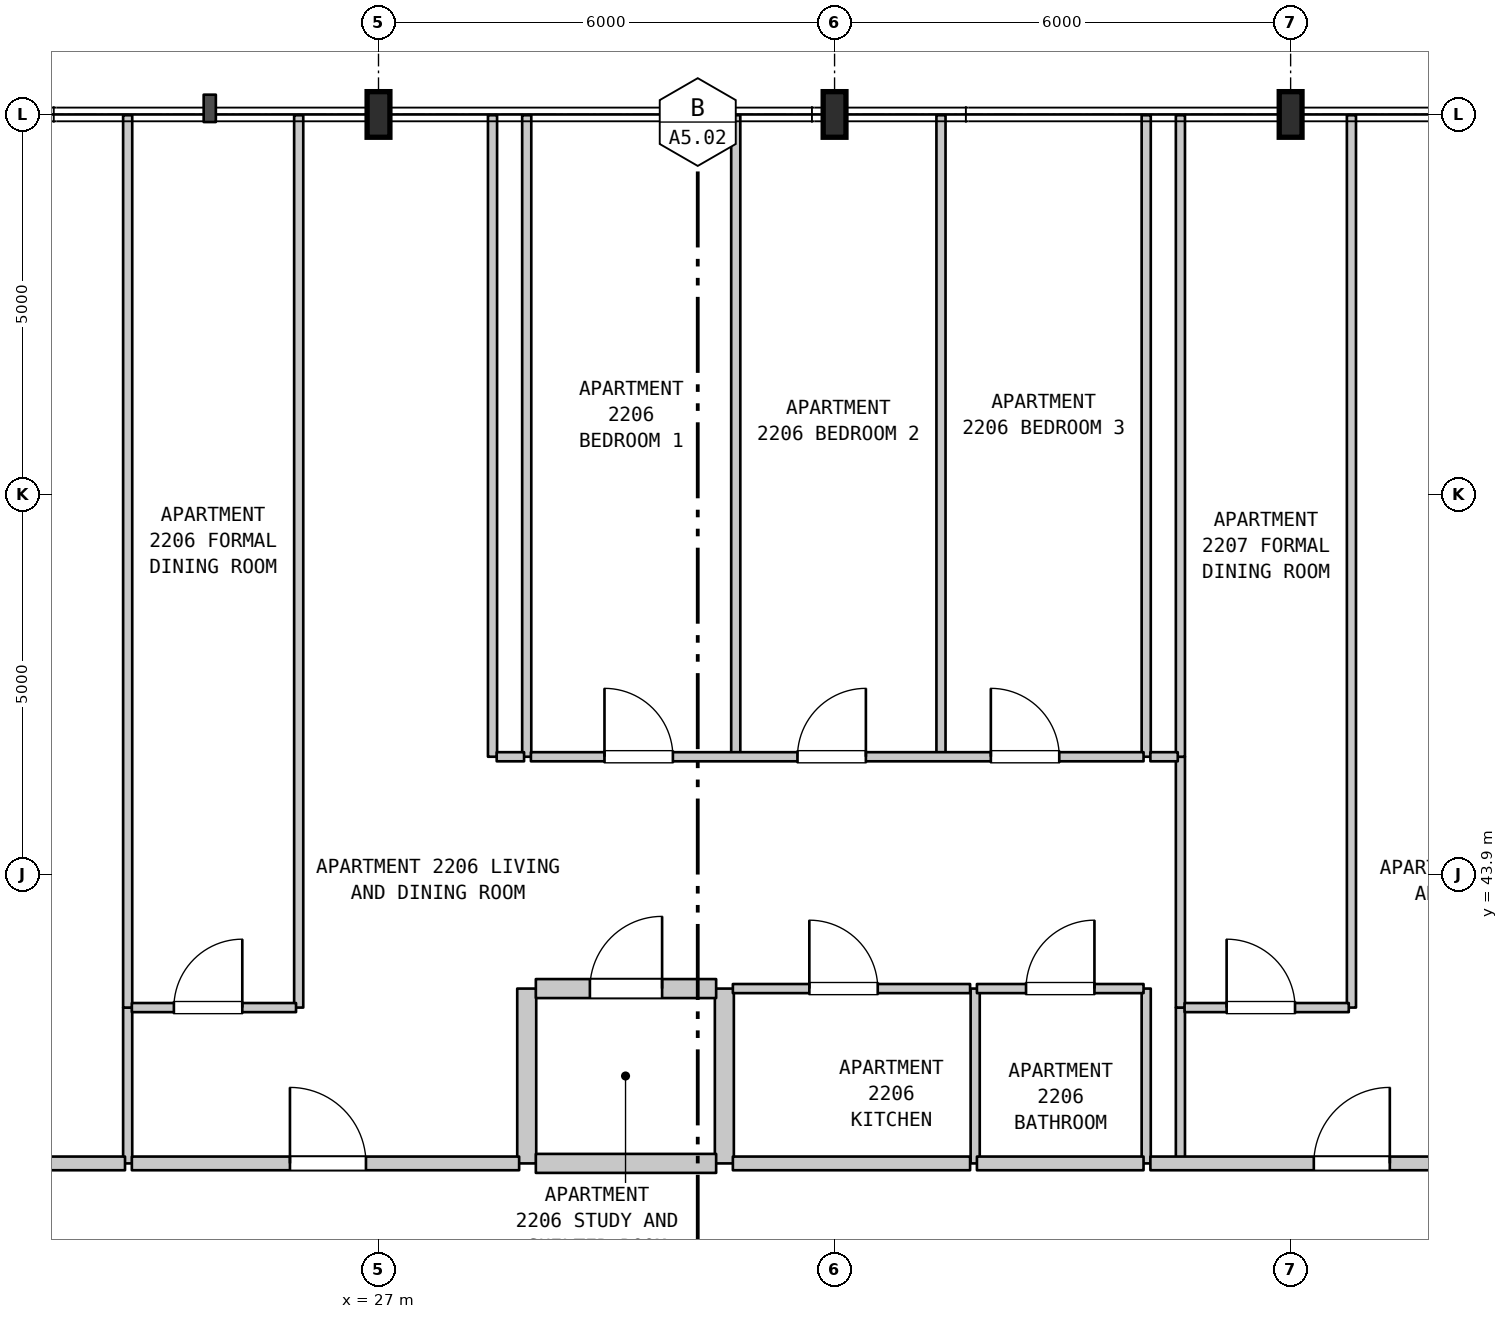
"""IFC4 building model, lengths in metres.
Left out: names, types, materials, properties, quantities, classifications, styles, units other than length and angle.
Written with IfcOpenShell. Run it as: python <this file> out.ifc"""

import sys

from ifc_helpers import new_model, si_unit, direction, frame, frame_2d, origin, origin_2d, place, context, subcontext, project, spatial, rectangle, i_section, extrude, element, fill, save


model = new_model("IFC4")
c1 = context("Model", 3, precision=1e-05, world=origin(), true_north=direction((0.0, 1.0)))
c2 = subcontext(c1, "Body", "Model", "MODEL_VIEW")
j1 = project(units=[si_unit("LENGTHUNIT", "METRE"), si_unit("PLANEANGLEUNIT", "RADIAN")], contexts=[c1])
p1 = place(None, origin())
s1 = spatial("IfcSite", under=j1, at=p1, CompositionType="ELEMENT")
p2 = place(p1, origin())
s2 = spatial("IfcBuilding", under=s1, at=p2, CompositionType="ELEMENT")
p3 = place(p2, frame((0.0, 0.0, 94.6)))
s3 = spatial("IfcBuildingStorey", under=s2, at=p3, CompositionType="ELEMENT", Elevation=94.6)
for number, where, z_axis, x_axis in (
    (1, (27.0, 53.9, 0.0), (0.0, 0.0, 1.0), (1.0, 0.0, 0.0)),
    (2, (33.0, 53.9, 0.0), (0.0, 0.0, 1.0), (1.0, 0.0, 0.0)),
    (3, (39.0, 53.9, 0.0), (0.0, 0.0, 1.0), (1.0, 0.0, 0.0)),
):
    element("IfcColumn", number, at=place(p3, frame(where, z_axis=z_axis, x_axis=x_axis)), inside=s3, PredefinedType="COLUMN", context=c2, shape_type="SweptSolid", body=[
        extrude(i_section(OverallWidth=0.3, OverallDepth=0.6, WebThickness=0.015, FlangeThickness=0.03, FilletRadius=0.027, at=origin_2d()), origin(), (0.0, 0.0, 1.0), 3.7),
    ])
p4 = place(p3, frame((23.7, 40.1, 0.0), z_axis=(0.0, 0.0, 1.0), x_axis=(0.0, 1.0, 0.0)))
e4 = element("IfcWall", 4, at=p4, inside=s3, PredefinedType="PARTITIONING", context=c2, shape_type="SweptSolid", body=[
    extrude(rectangle(XDim=2.05, YDim=0.12, at=frame_2d((1.025, 0.0))), origin(), (0.0, 0.0, 1.0), 3.385),
])
for number, where, z_axis, x_axis in (
    (5, (23.7, 42.15, 0.0), (0.0, 0.0, 1.0), (0.0, 1.0, 0.0)),
    (6, (25.95, 42.15, 0.0), (0.0, 0.0, 1.0), (0.0, 1.0, 0.0)),
):
    element("IfcWall", number, at=place(p3, frame(where, z_axis=z_axis, x_axis=x_axis)), inside=s3, PredefinedType="PARTITIONING", context=c2, shape_type="SweptSolid", body=[
        extrude(rectangle(XDim=11.74, YDim=0.12, at=frame_2d((5.87, 0.0))), origin(), (0.0, 0.0, 1.0), 3.385),
    ])
p5 = place(p3, frame((28.5, 45.45, 0.0), z_axis=(0.0, 0.0, 1.0), x_axis=(0.0, 1.0, 0.0)))
e7 = element("IfcWall", 7, at=p5, inside=s3, PredefinedType="PARTITIONING", context=c2, shape_type="SweptSolid", body=[
    extrude(rectangle(XDim=8.44, YDim=0.12, at=frame_2d((4.22, 0.0))), origin(), (0.0, 0.0, 1.0), 3.385),
])
p6 = place(p3, frame((28.95, 40.1, 0.0), z_axis=(0.0, 0.0, 1.0), x_axis=(0.0, 1.0, 0.0)))
e8 = element("IfcWall", 8, at=p6, inside=s3, PredefinedType="STANDARD", context=c2, shape_type="SweptSolid", body=[
    extrude(rectangle(XDim=2.3, YDim=0.25, at=frame_2d((1.15, 0.0))), origin(), (0.0, 0.0, 1.0), 3.385),
])
p7 = place(p3, frame((28.95, 45.45, 0.0), z_axis=(0.0, 0.0, 1.0), x_axis=(0.0, 1.0, 0.0)))
e9 = element("IfcWall", 9, at=p7, inside=s3, PredefinedType="PARTITIONING", context=c2, shape_type="SweptSolid", body=[
    extrude(rectangle(XDim=8.44, YDim=0.12, at=frame_2d((4.22, 0.0))), origin(), (0.0, 0.0, 1.0), 3.385),
])
p8 = place(p3, frame((31.55, 40.1, 0.0), z_axis=(0.0, 0.0, 1.0), x_axis=(0.0, 1.0, 0.0)))
e10 = element("IfcWall", 10, at=p8, inside=s3, PredefinedType="STANDARD", context=c2, shape_type="SweptSolid", body=[
    extrude(rectangle(XDim=2.3, YDim=0.25, at=frame_2d((1.15, 0.0))), origin(), (0.0, 0.0, 1.0), 3.385),
])
for number, where, z_axis, x_axis in (
    (11, (31.7, 45.45, 0.0), (0.0, 0.0, 1.0), (0.0, 1.0, 0.0)),
    (12, (34.4, 45.45, 0.0), (0.0, 0.0, 1.0), (0.0, 1.0, 0.0)),
):
    element("IfcWall", number, at=place(p3, frame(where, z_axis=z_axis, x_axis=x_axis)), inside=s3, PredefinedType="PARTITIONING", context=c2, shape_type="SweptSolid", body=[
        extrude(rectangle(XDim=8.44, YDim=0.12, at=frame_2d((4.22, 0.0))), origin(), (0.0, 0.0, 1.0), 3.385),
    ])
for number, where, z_axis, x_axis in (
    (13, (34.85, 40.1, 0.0), (0.0, 0.0, 1.0), (0.0, 1.0, 0.0)),
    (14, (37.1, 40.1, 0.0), (0.0, 0.0, 1.0), (0.0, 1.0, 0.0)),
):
    element("IfcWall", number, at=place(p3, frame(where, z_axis=z_axis, x_axis=x_axis)), inside=s3, PredefinedType="PARTITIONING", context=c2, shape_type="SweptSolid", body=[
        extrude(rectangle(XDim=2.3, YDim=0.12, at=frame_2d((1.15, 0.0))), origin(), (0.0, 0.0, 1.0), 3.385),
    ])
p9 = place(p3, frame((37.1, 45.45, 0.0), z_axis=(0.0, 0.0, 1.0), x_axis=(0.0, 1.0, 0.0)))
e15 = element("IfcWall", 15, at=p9, inside=s3, PredefinedType="PARTITIONING", context=c2, shape_type="SweptSolid", body=[
    extrude(rectangle(XDim=8.44, YDim=0.12, at=frame_2d((4.22, 0.0))), origin(), (0.0, 0.0, 1.0), 3.385),
])
p10 = place(p3, frame((37.55, 40.1, 0.0), z_axis=(0.0, 0.0, 1.0), x_axis=(0.0, 1.0, 0.0)))
e16 = element("IfcWall", 16, at=p10, inside=s3, PredefinedType="PARTITIONING", context=c2, shape_type="SweptSolid", body=[
    extrude(rectangle(XDim=2.05, YDim=0.12, at=frame_2d((1.025, 0.0))), origin(), (0.0, 0.0, 1.0), 3.385),
])
p11 = place(p3, frame((37.55, 42.15, 0.0), z_axis=(0.0, 0.0, 1.0), x_axis=(0.0, 1.0, 0.0)))
e17 = element("IfcWall", 17, at=p11, inside=s3, PredefinedType="PARTITIONING", context=c2, shape_type="SweptSolid", body=[
    extrude(rectangle(XDim=3.3, YDim=0.12, at=frame_2d((1.65, 0.0))), origin(), (0.0, 0.0, 1.0), 3.385),
])
p12 = place(p3, frame((37.55, 45.45, 0.0), z_axis=(0.0, 0.0, 1.0), x_axis=(0.0, 1.0, 0.0)))
e18 = element("IfcWall", 18, at=p12, inside=s3, PredefinedType="PARTITIONING", context=c2, shape_type="SweptSolid", body=[
    extrude(rectangle(XDim=8.44, YDim=0.12, at=frame_2d((4.22, 0.0))), origin(), (0.0, 0.0, 1.0), 3.385),
])
p13 = place(p3, frame((39.8, 42.15, 0.0), z_axis=(0.0, 0.0, 1.0), x_axis=(0.0, 1.0, 0.0)))
e19 = element("IfcWall", 19, at=p13, inside=s3, PredefinedType="PARTITIONING", context=c2, shape_type="SweptSolid", body=[
    extrude(rectangle(XDim=11.74, YDim=0.12, at=frame_2d((5.87, 0.0))), origin(), (0.0, 0.0, 1.0), 3.385),
])
p14 = place(p3, frame((21.255, 40.1, 0.0), z_axis=(0.0, 0.0, 1.0), x_axis=(1.0, 0.0, 0.0)))
e20 = element("IfcWall", 20, at=p14, inside=s3, PredefinedType="STANDARD", context=c2, shape_type="SweptSolid", body=[
    extrude(rectangle(XDim=2.41, YDim=0.18, at=frame_2d((1.205, 0.0))), origin(), (0.0, 0.0, 1.0), 3.385),
])
p15 = place(p3, frame((23.755, 40.1, 0.0), z_axis=(0.0, 0.0, 1.0), x_axis=(1.0, 0.0, 0.0)))
e21 = element("IfcWall", 21, at=p15, inside=s3, PredefinedType="STANDARD", context=c2, shape_type="SweptSolid", body=[
    extrude(rectangle(XDim=5.095, YDim=0.18, at=frame_2d((2.548, 0.0))), origin(), (0.0, 0.0, 1.0), 3.385),
])
p16 = place(p15, frame((2.08, 0.0, 0.0)))
e22 = element("IfcOpeningElement", 22, at=p16, cuts=e21, PredefinedType="OPENING", context=c2, shape_type="SweptSolid", body=[
    extrude(rectangle(XDim=1.0, YDim=2.15, at=frame_2d((0.5, 1.075))), frame((0.0, 0.1, 0.0), z_axis=(0.0, -1.0, 0.0), x_axis=(1.0, 0.0, 0.0)), (0.0, 0.0, 1.0), 0.2),
])
p17 = place(p3, frame((29.07, 40.1, 0.0), z_axis=(0.0, 0.0, 1.0), x_axis=(1.0, 0.0, 0.0)))
e23 = element("IfcWall", 23, at=p17, inside=s3, PredefinedType="STANDARD", context=c2, shape_type="SweptSolid", body=[
    extrude(rectangle(XDim=2.372, YDim=0.25, at=frame_2d((1.186, 0.0))), origin(), (0.0, 0.0, 1.0), 3.385),
])
p18 = place(p3, frame((31.662, 40.1, 0.0), z_axis=(0.0, 0.0, 1.0), x_axis=(1.0, 0.0, 0.0)))
e24 = element("IfcWall", 24, at=p18, inside=s3, PredefinedType="STANDARD", context=c2, shape_type="SweptSolid", body=[
    extrude(rectangle(XDim=3.121, YDim=0.18, at=frame_2d((1.561, 0.0))), origin(), (0.0, 0.0, 1.0), 3.385),
])
p19 = place(p3, frame((34.873, 40.1, 0.0), z_axis=(0.0, 0.0, 1.0), x_axis=(1.0, 0.0, 0.0)))
e25 = element("IfcWall", 25, at=p19, inside=s3, PredefinedType="STANDARD", context=c2, shape_type="SweptSolid", body=[
    extrude(rectangle(XDim=2.192, YDim=0.18, at=frame_2d((1.096, 0.0))), origin(), (0.0, 0.0, 1.0), 3.385),
])
p20 = place(p3, frame((37.155, 40.1, 0.0), z_axis=(0.0, 0.0, 1.0), x_axis=(1.0, 0.0, 0.0)))
e26 = element("IfcWall", 26, at=p20, inside=s3, PredefinedType="STANDARD", context=c2, shape_type="SweptSolid", body=[
    extrude(rectangle(XDim=5.3, YDim=0.18, at=frame_2d((2.65, 0.0))), origin(), (0.0, 0.0, 1.0), 3.385),
])
p21 = place(p20, frame((2.15, 0.0, 0.0)))
e27 = element("IfcOpeningElement", 27, at=p21, cuts=e26, PredefinedType="OPENING", context=c2, shape_type="SweptSolid", body=[
    extrude(rectangle(XDim=1.0, YDim=2.15, at=frame_2d((0.5, 1.075))), frame((0.0, 0.1, 0.0), z_axis=(0.0, -1.0, 0.0), x_axis=(1.0, 0.0, 0.0)), (0.0, 0.0, 1.0), 0.2),
])
p22 = place(p3, frame((23.755, 42.15, 0.0), z_axis=(0.0, 0.0, 1.0), x_axis=(1.0, 0.0, 0.0)))
e28 = element("IfcWall", 28, at=p22, inside=s3, PredefinedType="PARTITIONING", context=c2, shape_type="SweptSolid", body=[
    extrude(rectangle(XDim=2.16, YDim=0.12, at=frame_2d((1.08, 0.0))), origin(), (0.0, 0.0, 1.0), 3.385),
])
p23 = place(p22, frame((0.553, 0.0, 0.0)))
e29 = element("IfcOpeningElement", 29, at=p23, cuts=e28, PredefinedType="OPENING", context=c2, shape_type="SweptSolid", body=[
    extrude(rectangle(XDim=0.9, YDim=2.15, at=frame_2d((0.45, 1.075))), frame((0.0, 0.07, 0.0), z_axis=(0.0, -1.0, 0.0), x_axis=(1.0, 0.0, 0.0)), (0.0, 0.0, 1.0), 0.14),
])
p24 = place(p3, frame((37.605, 42.15, 0.0), z_axis=(0.0, 0.0, 1.0), x_axis=(1.0, 0.0, 0.0)))
e30 = element("IfcWall", 30, at=p24, inside=s3, PredefinedType="PARTITIONING", context=c2, shape_type="SweptSolid", body=[
    extrude(rectangle(XDim=2.16, YDim=0.12, at=frame_2d((1.08, 0.0))), origin(), (0.0, 0.0, 1.0), 3.385),
])
p25 = place(p24, frame((0.553, 0.0, 0.0)))
e31 = element("IfcOpeningElement", 31, at=p25, cuts=e30, PredefinedType="OPENING", context=c2, shape_type="SweptSolid", body=[
    extrude(rectangle(XDim=0.9, YDim=2.15, at=frame_2d((0.45, 1.075))), frame((0.0, 0.07, 0.0), z_axis=(0.0, -1.0, 0.0), x_axis=(1.0, 0.0, 0.0)), (0.0, 0.0, 1.0), 0.14),
])
p26 = place(p3, frame((29.07, 42.4, 0.0), z_axis=(0.0, 0.0, 1.0), x_axis=(1.0, 0.0, 0.0)))
e32 = element("IfcWall", 32, at=p26, inside=s3, PredefinedType="STANDARD", context=c2, shape_type="SweptSolid", body=[
    extrude(rectangle(XDim=2.372, YDim=0.25, at=frame_2d((1.186, 0.0))), origin(), (0.0, 0.0, 1.0), 3.385),
])
p27 = place(p26, frame((0.711, 0.0, 0.0)))
e33 = element("IfcOpeningElement", 33, at=p27, cuts=e32, PredefinedType="OPENING", context=c2, shape_type="SweptSolid", body=[
    extrude(rectangle(XDim=0.95, YDim=2.15, at=frame_2d((0.475, 1.075))), frame((0.0, 0.135, 0.0), z_axis=(0.0, -1.0, 0.0), x_axis=(1.0, 0.0, 0.0)), (0.0, 0.0, 1.0), 0.27),
])
p28 = place(p3, frame((31.662, 42.4, 0.0), z_axis=(0.0, 0.0, 1.0), x_axis=(1.0, 0.0, 0.0)))
e34 = element("IfcWall", 34, at=p28, inside=s3, PredefinedType="PARTITIONING", context=c2, shape_type="SweptSolid", body=[
    extrude(rectangle(XDim=3.121, YDim=0.12, at=frame_2d((1.561, 0.0))), origin(), (0.0, 0.0, 1.0), 3.385),
])
p29 = place(p28, frame((1.006, 0.0, 0.0)))
e35 = element("IfcOpeningElement", 35, at=p29, cuts=e34, PredefinedType="OPENING", context=c2, shape_type="SweptSolid", body=[
    extrude(rectangle(XDim=0.9, YDim=2.15, at=frame_2d((0.45, 1.075))), frame((0.0, 0.07, 0.0), z_axis=(0.0, -1.0, 0.0), x_axis=(1.0, 0.0, 0.0)), (0.0, 0.0, 1.0), 0.14),
])
p30 = place(p3, frame((34.873, 42.4, 0.0), z_axis=(0.0, 0.0, 1.0), x_axis=(1.0, 0.0, 0.0)))
e36 = element("IfcWall", 36, at=p30, inside=s3, PredefinedType="PARTITIONING", context=c2, shape_type="SweptSolid", body=[
    extrude(rectangle(XDim=2.192, YDim=0.12, at=frame_2d((1.096, 0.0))), origin(), (0.0, 0.0, 1.0), 3.385),
])
p31 = place(p30, frame((0.646, 0.0, 0.0)))
e37 = element("IfcOpeningElement", 37, at=p31, cuts=e36, PredefinedType="OPENING", context=c2, shape_type="SweptSolid", body=[
    extrude(rectangle(XDim=0.9, YDim=2.1, at=frame_2d((0.45, 1.05))), frame((0.0, 0.07, 0.0), z_axis=(0.0, -1.0, 0.0), x_axis=(1.0, 0.0, 0.0)), (0.0, 0.0, 1.0), 0.14),
])
p32 = place(p3, frame((28.555, 45.45, 0.0), z_axis=(0.0, 0.0, 1.0), x_axis=(1.0, 0.0, 0.0)))
e38 = element("IfcWall", 38, at=p32, inside=s3, PredefinedType="PARTITIONING", context=c2, shape_type="SweptSolid", body=[
    extrude(rectangle(XDim=0.36, YDim=0.12, at=frame_2d((0.18, 0.0))), origin(), (0.0, 0.0, 1.0), 3.385),
])
p33 = place(p3, frame((29.005, 45.45, 0.0), z_axis=(0.0, 0.0, 1.0), x_axis=(1.0, 0.0, 0.0)))
e39 = element("IfcWall", 39, at=p33, inside=s3, PredefinedType="PARTITIONING", context=c2, shape_type="SweptSolid", body=[
    extrude(rectangle(XDim=8.06, YDim=0.12, at=frame_2d((4.03, 0.0))), origin(), (0.0, 0.0, 1.0), 3.385),
])
p34 = place(p33, frame((0.968, 0.0, 0.0)))
e40 = element("IfcOpeningElement", 40, at=p34, cuts=e39, PredefinedType="OPENING", context=c2, shape_type="SweptSolid", body=[
    extrude(rectangle(XDim=0.9, YDim=2.15, at=frame_2d((0.45, 1.075))), frame((0.0, 0.07, 0.0), z_axis=(0.0, -1.0, 0.0), x_axis=(1.0, 0.0, 0.0)), (0.0, 0.0, 1.0), 0.14),
])
p35 = place(p33, frame((3.507, 0.0, 0.0)))
e41 = element("IfcOpeningElement", 41, at=p35, cuts=e39, PredefinedType="OPENING", context=c2, shape_type="SweptSolid", body=[
    extrude(rectangle(XDim=0.9, YDim=2.15, at=frame_2d((0.45, 1.075))), frame((0.0, 0.07, 0.0), z_axis=(0.0, -1.0, 0.0), x_axis=(1.0, 0.0, 0.0)), (0.0, 0.0, 1.0), 0.14),
])
p36 = place(p33, frame((6.051, 0.0, 0.0)))
e42 = element("IfcOpeningElement", 42, at=p36, cuts=e39, PredefinedType="OPENING", context=c2, shape_type="SweptSolid", body=[
    extrude(rectangle(XDim=0.9, YDim=2.15, at=frame_2d((0.45, 1.075))), frame((0.0, 0.07, 0.0), z_axis=(0.0, -1.0, 0.0), x_axis=(1.0, 0.0, 0.0)), (0.0, 0.0, 1.0), 0.14),
])
p37 = place(p3, frame((37.155, 45.45, 0.0), z_axis=(0.0, 0.0, 1.0), x_axis=(1.0, 0.0, 0.0)))
e43 = element("IfcWall", 43, at=p37, inside=s3, PredefinedType="PARTITIONING", context=c2, shape_type="SweptSolid", body=[
    extrude(rectangle(XDim=0.36, YDim=0.12, at=frame_2d((0.18, 0.0))), origin(), (0.0, 0.0, 1.0), 3.385),
])
p38 = place(p16, origin())
e44 = element("IfcDoor", 44, at=p38, inside=s3, OperationType="SINGLE_SWING_LEFT", PredefinedType="DOOR", context=c2, shape_type="SweptSolid", body=[
    extrude(rectangle(XDim=1.0, YDim=2.15, at=frame_2d((0.5, 1.075))), frame((0.0, 0.025, 0.0), z_axis=(0.0, -1.0, 0.0), x_axis=(1.0, 0.0, 0.0)), (0.0, 0.0, 1.0), 0.05),
])
fill(e22, e44)
p39 = place(p21, origin())
e45 = element("IfcDoor", 45, at=p39, inside=s3, OperationType="SINGLE_SWING_RIGHT", PredefinedType="DOOR", context=c2, shape_type="SweptSolid", body=[
    extrude(rectangle(XDim=1.0, YDim=2.15, at=frame_2d((0.5, 1.075))), frame((0.0, 0.025, 0.0), z_axis=(0.0, -1.0, 0.0), x_axis=(1.0, 0.0, 0.0)), (0.0, 0.0, 1.0), 0.05),
])
fill(e27, e45)
p40 = place(p23, origin())
e46 = element("IfcDoor", 46, at=p40, inside=s3, OperationType="SINGLE_SWING_RIGHT", PredefinedType="DOOR", context=c2, shape_type="SweptSolid", body=[
    extrude(rectangle(XDim=0.9, YDim=2.15, at=frame_2d((0.45, 1.075))), frame((0.0, 0.025, 0.0), z_axis=(0.0, -1.0, 0.0), x_axis=(1.0, 0.0, 0.0)), (0.0, 0.0, 1.0), 0.05),
])
fill(e29, e46)
p41 = place(p25, origin())
e47 = element("IfcDoor", 47, at=p41, inside=s3, OperationType="SINGLE_SWING_LEFT", PredefinedType="DOOR", context=c2, shape_type="SweptSolid", body=[
    extrude(rectangle(XDim=0.9, YDim=2.15, at=frame_2d((0.45, 1.075))), frame((0.0, 0.025, 0.0), z_axis=(0.0, -1.0, 0.0), x_axis=(1.0, 0.0, 0.0)), (0.0, 0.0, 1.0), 0.05),
])
fill(e31, e47)
p42 = place(p27, origin())
e48 = element("IfcDoor", 48, at=p42, inside=s3, OperationType="SINGLE_SWING_RIGHT", PredefinedType="DOOR", context=c2, shape_type="SweptSolid", body=[
    extrude(rectangle(XDim=0.95, YDim=2.15, at=frame_2d((0.475, 1.075))), frame((0.0, 0.025, 0.0), z_axis=(0.0, -1.0, 0.0), x_axis=(1.0, 0.0, 0.0)), (0.0, 0.0, 1.0), 0.05),
])
fill(e33, e48)
p43 = place(p29, origin())
e49 = element("IfcDoor", 49, at=p43, inside=s3, OperationType="SINGLE_SWING_LEFT", PredefinedType="DOOR", context=c2, shape_type="SweptSolid", body=[
    extrude(rectangle(XDim=0.9, YDim=2.15, at=frame_2d((0.45, 1.075))), frame((0.0, 0.025, 0.0), z_axis=(0.0, -1.0, 0.0), x_axis=(1.0, 0.0, 0.0)), (0.0, 0.0, 1.0), 0.05),
])
fill(e35, e49)
p44 = place(p31, origin())
e50 = element("IfcDoor", 50, at=p44, inside=s3, OperationType="SINGLE_SWING_RIGHT", PredefinedType="DOOR", context=c2, shape_type="SweptSolid", body=[
    extrude(rectangle(XDim=0.9, YDim=2.1, at=frame_2d((0.45, 1.05))), frame((0.0, 0.025, 0.0), z_axis=(0.0, -1.0, 0.0), x_axis=(1.0, 0.0, 0.0)), (0.0, 0.0, 1.0), 0.05),
])
fill(e37, e50)
p45 = place(p34, origin())
e51 = element("IfcDoor", 51, at=p45, inside=s3, OperationType="SINGLE_SWING_LEFT", PredefinedType="DOOR", context=c2, shape_type="SweptSolid", body=[
    extrude(rectangle(XDim=0.9, YDim=2.15, at=frame_2d((0.45, 1.075))), frame((0.0, 0.025, 0.0), z_axis=(0.0, -1.0, 0.0), x_axis=(1.0, 0.0, 0.0)), (0.0, 0.0, 1.0), 0.05),
])
fill(e40, e51)
p46 = place(p35, origin())
e52 = element("IfcDoor", 52, at=p46, inside=s3, OperationType="SINGLE_SWING_RIGHT", PredefinedType="DOOR", context=c2, shape_type="SweptSolid", body=[
    extrude(rectangle(XDim=0.9, YDim=2.15, at=frame_2d((0.45, 1.075))), frame((0.0, 0.025, 0.0), z_axis=(0.0, -1.0, 0.0), x_axis=(1.0, 0.0, 0.0)), (0.0, 0.0, 1.0), 0.05),
])
fill(e41, e52)
p47 = place(p36, origin())
e53 = element("IfcDoor", 53, at=p47, inside=s3, OperationType="SINGLE_SWING_LEFT", PredefinedType="DOOR", context=c2, shape_type="SweptSolid", body=[
    extrude(rectangle(XDim=0.9, YDim=2.15, at=frame_2d((0.45, 1.075))), frame((0.0, 0.025, 0.0), z_axis=(0.0, -1.0, 0.0), x_axis=(1.0, 0.0, 0.0)), (0.0, 0.0, 1.0), 0.05),
])
fill(e42, e53)
save(model, sys.argv[1])
